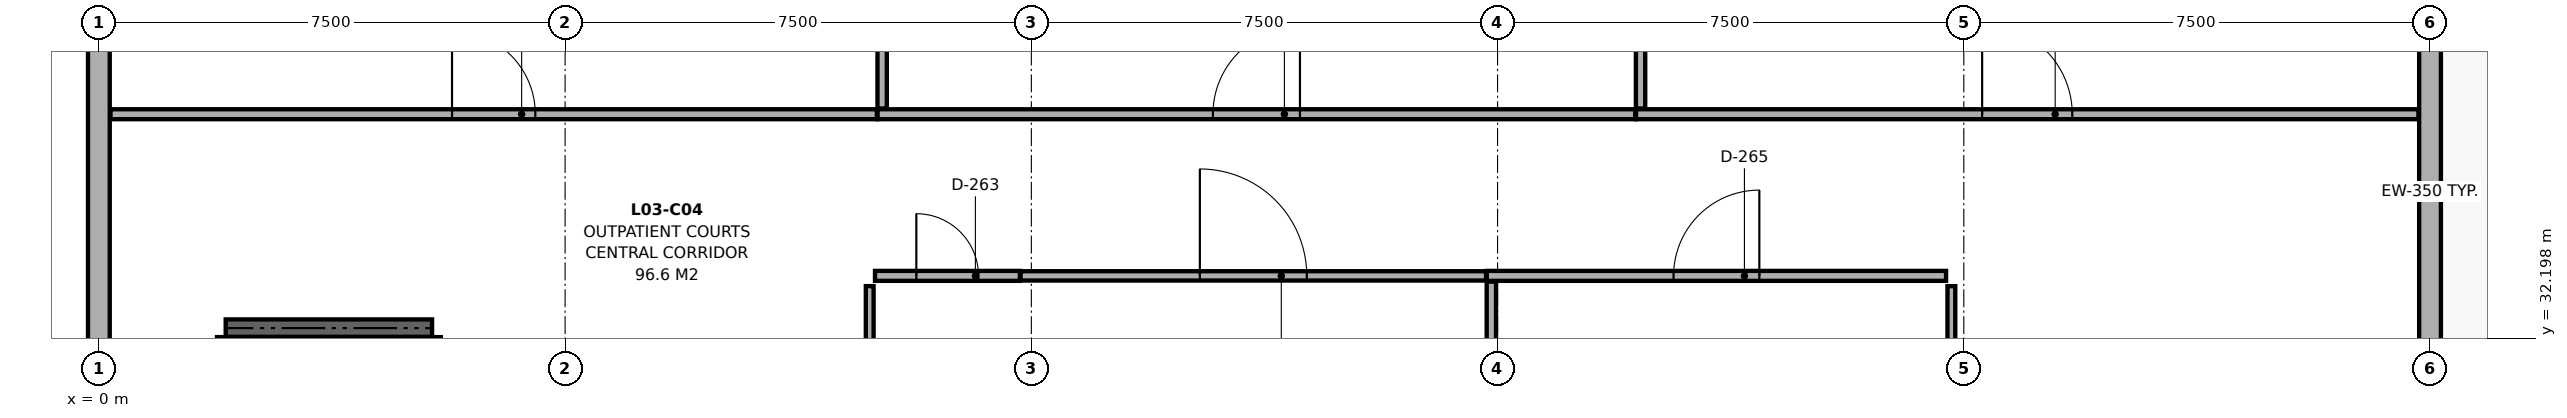
"""IFC4 building model, lengths in metres.
Left out: names, types, materials, properties, quantities, classifications, styles, units other than length and angle.
Written with IfcOpenShell. Run it as: python <this file> out.ifc"""

import sys

from ifc_helpers import new_model, si_unit, direction, frame, frame_2d, origin, place, context, subcontext, project, spatial, rectangle, extrude, element, fill, save


model = new_model("IFC4")
c1 = context("Model", 3, precision=1e-05, world=origin(), true_north=direction((0.0, 1.0)))
c2 = subcontext(c1, "Body", "Model", "MODEL_VIEW")
j1 = project(units=[si_unit("LENGTHUNIT", "METRE"), si_unit("PLANEANGLEUNIT", "RADIAN")], contexts=[c1])
p1 = place(None, origin())
s1 = spatial("IfcSite", under=j1, at=p1, CompositionType="ELEMENT")
p2 = place(p1, origin())
s2 = spatial("IfcBuilding", under=s1, at=p2, CompositionType="ELEMENT")
p3 = place(p2, frame((0.0, 0.0, 13.5)))
s3 = spatial("IfcBuildingStorey", under=s2, at=p3, CompositionType="ELEMENT", Elevation=13.5)
p4 = place(p3, frame((37.5, 38.05, 0.0), z_axis=(0.0, 0.0, 1.0), x_axis=(0.0, -1.0, 0.0)))
e1 = element("IfcWall", 1, at=p4, inside=s3, PredefinedType="SOLIDWALL", context=c2, shape_type="SweptSolid", body=[
    extrude(rectangle(XDim=7.0, YDim=0.35, at=frame_2d((3.5, 0.0))), origin(), (0.0, 0.0, 1.0), 3.7),
])
p5 = place(p3, frame((0.0, 31.1, 0.0), z_axis=(0.0, 0.0, 1.0), x_axis=(0.0, 1.0, 0.0)))
e2 = element("IfcWall", 2, at=p5, inside=s3, PredefinedType="SOLIDWALL", context=c2, shape_type="SweptSolid", body=[
    extrude(rectangle(XDim=6.9, YDim=0.35, at=frame_2d((3.45, 0.0))), origin(), (0.0, 0.0, 1.0), 2.805),
])
p6 = place(p3, frame((5.36, 24.985, 0.0), z_axis=(0.0, 0.0, 1.0), x_axis=(0.0, 1.0, 0.0)))
e3 = element("IfcWall", 3, at=p6, inside=s3, PredefinedType="SHEAR", context=c2, shape_type="SweptSolid", body=[
    extrude(rectangle(XDim=7.23, YDim=0.28, at=frame_2d((3.615, 0.0))), origin(), (0.0, 0.0, 1.0), 3.72),
])
p7 = place(p3, frame((5.36, 32.36, 0.0), z_axis=(0.0, 0.0, 1.0), x_axis=(-1.0, 0.0, 0.0)))
e4 = element("IfcWall", 4, at=p7, inside=s3, PredefinedType="SHEAR", context=c2, shape_type="SweptSolid", body=[
    extrude(rectangle(XDim=3.32, YDim=0.28, at=frame_2d((1.66, 0.0))), origin(), (0.0, 0.0, 1.0), 3.72),
])
p8 = place(p3, frame((2.04, 32.215, 0.0), z_axis=(0.0, 0.0, 1.0), x_axis=(0.0, -1.0, 0.0)))
e5 = element("IfcWall", 5, at=p8, inside=s3, PredefinedType="SHEAR", context=c2, shape_type="SweptSolid", body=[
    extrude(rectangle(XDim=7.23, YDim=0.28, at=frame_2d((3.615, 0.0))), origin(), (0.0, 0.0, 1.0), 3.72),
])
p9 = place(p3, frame((0.187, 35.8, 0.0), z_axis=(0.0, 0.0, 1.0), x_axis=(1.0, 0.0, 0.0)))
e6 = element("IfcWall", 6, at=p9, inside=s3, PredefinedType="PARTITIONING", context=c2, shape_type="SweptSolid", body=[
    extrude(rectangle(XDim=12.328, YDim=0.16, at=frame_2d((6.164, 0.0))), origin(), (0.0, 0.0, 1.0), 2.805),
])
p10 = place(p9, frame((5.494, 0.0, 0.0)))
e7 = element("IfcOpeningElement", 7, at=p10, cuts=e6, PredefinedType="OPENING", context=c2, shape_type="SweptSolid", body=[
    extrude(rectangle(XDim=1.34, YDim=2.24, at=frame_2d((0.67, 1.12))), frame((0.0, 0.092, 0.0), z_axis=(0.0, -1.0, 0.0), x_axis=(1.0, 0.0, 0.0)), (0.0, 0.0, 1.0), 0.184),
])
p11 = place(p3, frame((12.527, 35.8, 0.0), z_axis=(0.0, 0.0, 1.0), x_axis=(1.0, 0.0, 0.0)))
e8 = element("IfcWall", 8, at=p11, inside=s3, PredefinedType="PARTITIONING", context=c2, shape_type="SweptSolid", body=[
    extrude(rectangle(XDim=12.188, YDim=0.16, at=frame_2d((6.094, 0.0))), origin(), (0.0, 0.0, 1.0), 2.805),
])
p12 = place(p11, frame((5.394, 0.0, 0.0)))
e9 = element("IfcOpeningElement", 9, at=p12, cuts=e8, PredefinedType="OPENING", context=c2, shape_type="SweptSolid", body=[
    extrude(rectangle(XDim=1.4, YDim=2.25, at=frame_2d((0.7, 1.125))), frame((0.0, 0.092, 0.0), z_axis=(0.0, -1.0, 0.0), x_axis=(1.0, 0.0, 0.0)), (0.0, 0.0, 1.0), 0.184),
])
p13 = place(p3, frame((24.727, 35.8, 0.0), z_axis=(0.0, 0.0, 1.0), x_axis=(1.0, 0.0, 0.0)))
e10 = element("IfcWall", 10, at=p13, inside=s3, PredefinedType="PARTITIONING", context=c2, shape_type="SweptSolid", body=[
    extrude(rectangle(XDim=12.586, YDim=0.16, at=frame_2d((6.293, 0.0))), origin(), (0.0, 0.0, 1.0), 3.055),
])
p14 = place(p13, frame((5.568, 0.0, 0.0)))
e11 = element("IfcOpeningElement", 11, at=p14, cuts=e10, PredefinedType="OPENING", context=c2, shape_type="SweptSolid", body=[
    extrude(rectangle(XDim=1.45, YDim=2.26, at=frame_2d((0.725, 1.13))), frame((0.0, 0.092, 0.0), z_axis=(0.0, -1.0, 0.0), x_axis=(1.0, 0.0, 0.0)), (0.0, 0.0, 1.0), 0.184),
])
p15 = place(p3, frame((12.485, 33.2, 0.0), z_axis=(0.0, 0.0, 1.0), x_axis=(1.0, 0.0, 0.0)))
e12 = element("IfcWall", 12, at=p15, inside=s3, PredefinedType="PARTITIONING", context=c2, shape_type="SweptSolid", body=[
    extrude(rectangle(XDim=2.33, YDim=0.16, at=frame_2d((1.165, 0.0))), origin(), (0.0, 0.0, 1.0), 2.805),
])
p16 = place(p15, frame((0.665, 0.0, 0.0)))
e13 = element("IfcOpeningElement", 13, at=p16, cuts=e12, PredefinedType="OPENING", context=c2, shape_type="SweptSolid", body=[
    extrude(rectangle(XDim=1.0, YDim=2.15, at=frame_2d((0.5, 1.075))), frame((0.0, 0.092, 0.0), z_axis=(0.0, -1.0, 0.0), x_axis=(1.0, 0.0, 0.0)), (0.0, 0.0, 1.0), 0.184),
])
p17 = place(p3, frame((14.827, 33.2, 0.0), z_axis=(0.0, 0.0, 1.0), x_axis=(1.0, 0.0, 0.0)))
e14 = element("IfcWall", 14, at=p17, inside=s3, PredefinedType="PARTITIONING", context=c2, shape_type="SweptSolid", body=[
    extrude(rectangle(XDim=7.488, YDim=0.15, at=frame_2d((3.744, 0.0))), origin(), (0.0, 0.0, 1.0), 2.805),
])
p18 = place(p17, frame((2.884, 0.0, 0.0)))
e15 = element("IfcOpeningElement", 15, at=p18, cuts=e14, PredefinedType="OPENING", context=c2, shape_type="SweptSolid", body=[
    extrude(rectangle(XDim=1.72, YDim=2.34, at=frame_2d((0.86, 1.17))), frame((0.0, 0.087, 0.0), z_axis=(0.0, -1.0, 0.0), x_axis=(1.0, 0.0, 0.0)), (0.0, 0.0, 1.0), 0.174),
])
p19 = place(p3, frame((22.327, 33.2, 0.0), z_axis=(0.0, 0.0, 1.0), x_axis=(1.0, 0.0, 0.0)))
e16 = element("IfcWall", 16, at=p19, inside=s3, PredefinedType="PARTITIONING", context=c2, shape_type="SweptSolid", body=[
    extrude(rectangle(XDim=7.388, YDim=0.16, at=frame_2d((3.694, 0.0))), origin(), (0.0, 0.0, 1.0), 2.805),
])
p20 = place(p19, frame((3.004, 0.0, 0.0)))
e17 = element("IfcOpeningElement", 17, at=p20, cuts=e16, PredefinedType="OPENING", context=c2, shape_type="SweptSolid", body=[
    extrude(rectangle(XDim=1.38, YDim=2.3, at=frame_2d((0.69, 1.15))), frame((0.0, 0.092, 0.0), z_axis=(0.0, -1.0, 0.0), x_axis=(1.0, 0.0, 0.0)), (0.0, 0.0, 1.0), 0.184),
])
p21 = place(p3, frame((12.6, 35.892, 0.0), z_axis=(0.0, 0.0, 1.0), x_axis=(0.0, 1.0, 0.0)))
e18 = element("IfcWall", 18, at=p21, inside=s3, PredefinedType="PARTITIONING", context=c2, shape_type="SweptSolid", body=[
    extrude(rectangle(XDim=9.663, YDim=0.15, at=frame_2d((4.832, 0.0))), origin(), (0.0, 0.0, 1.0), 2.805),
])
p22 = place(p3, frame((24.8, 35.892, 0.0), z_axis=(0.0, 0.0, 1.0), x_axis=(0.0, 1.0, 0.0)))
e19 = element("IfcWall", 19, at=p22, inside=s3, PredefinedType="PARTITIONING", context=c2, shape_type="SweptSolid", body=[
    extrude(rectangle(XDim=9.721, YDim=0.15, at=frame_2d((4.86, 0.0))), origin(), (0.0, 0.0, 1.0), 2.805),
])
p23 = place(p3, frame((12.4, 15.965, 0.0), z_axis=(0.0, 0.0, 1.0), x_axis=(0.0, 1.0, 0.0)))
e20 = element("IfcWall", 20, at=p23, inside=s3, PredefinedType="PARTITIONING", context=c2, shape_type="SweptSolid", body=[
    extrude(rectangle(XDim=17.07, YDim=0.125, at=frame_2d((8.535, 0.0))), origin(), (0.0, 0.0, 1.0), 2.805),
])
p24 = place(p3, frame((22.4, 31.112, 0.0), z_axis=(0.0, 0.0, 1.0), x_axis=(0.0, 1.0, 0.0)))
e21 = element("IfcWall", 21, at=p24, inside=s3, PredefinedType="PARTITIONING", context=c2, shape_type="SweptSolid", body=[
    extrude(rectangle(XDim=1.996, YDim=0.15, at=frame_2d((0.998, 0.0))), origin(), (0.0, 0.0, 1.0), 2.805),
])
p25 = place(p3, frame((29.8, 31.112, 0.0), z_axis=(0.0, 0.0, 1.0), x_axis=(0.0, 1.0, 0.0)))
e22 = element("IfcWall", 22, at=p25, inside=s3, PredefinedType="PARTITIONING", context=c2, shape_type="SweptSolid", body=[
    extrude(rectangle(XDim=1.923, YDim=0.125, at=frame_2d((0.961, 0.0))), origin(), (0.0, 0.0, 1.0), 3.055),
])
p26 = place(p10, origin())
e23 = element("IfcDoor", 23, at=p26, inside=s3, OperationType="SINGLE_SWING_LEFT", PredefinedType="DOOR", context=c2, shape_type="SweptSolid", body=[
    extrude(rectangle(XDim=1.34, YDim=2.24, at=frame_2d((0.67, 1.12))), frame((0.0, 0.025, 0.0), z_axis=(0.0, -1.0, 0.0), x_axis=(1.0, 0.0, 0.0)), (0.0, 0.0, 1.0), 0.05),
])
fill(e7, e23)
p27 = place(p12, origin())
e24 = element("IfcDoor", 24, at=p27, inside=s3, OperationType="SINGLE_SWING_RIGHT", PredefinedType="DOOR", context=c2, shape_type="SweptSolid", body=[
    extrude(rectangle(XDim=1.4, YDim=2.25, at=frame_2d((0.7, 1.125))), frame((0.0, 0.025, 0.0), z_axis=(0.0, -1.0, 0.0), x_axis=(1.0, 0.0, 0.0)), (0.0, 0.0, 1.0), 0.05),
])
fill(e9, e24)
p28 = place(p14, origin())
e25 = element("IfcDoor", 25, at=p28, inside=s3, OperationType="SINGLE_SWING_LEFT", PredefinedType="DOOR", context=c2, shape_type="SweptSolid", body=[
    extrude(rectangle(XDim=1.45, YDim=2.26, at=frame_2d((0.725, 1.13))), frame((0.0, 0.025, 0.0), z_axis=(0.0, -1.0, 0.0), x_axis=(1.0, 0.0, 0.0)), (0.0, 0.0, 1.0), 0.05),
])
fill(e11, e25)
p29 = place(p16, origin())
e26 = element("IfcDoor", 26, at=p29, inside=s3, OperationType="SINGLE_SWING_LEFT", PredefinedType="DOOR", context=c2, shape_type="SweptSolid", body=[
    extrude(rectangle(XDim=1.0, YDim=2.15, at=frame_2d((0.5, 1.075))), frame((0.0, 0.025, 0.0), z_axis=(0.0, -1.0, 0.0), x_axis=(1.0, 0.0, 0.0)), (0.0, 0.0, 1.0), 0.05),
])
fill(e13, e26)
p30 = place(p18, origin())
e27 = element("IfcDoor", 27, at=p30, inside=s3, OperationType="SINGLE_SWING_LEFT", PredefinedType="DOOR", context=c2, shape_type="SweptSolid", body=[
    extrude(rectangle(XDim=1.72, YDim=2.34, at=frame_2d((0.86, 1.17))), frame((0.0, 0.025, 0.0), z_axis=(0.0, -1.0, 0.0), x_axis=(1.0, 0.0, 0.0)), (0.0, 0.0, 1.0), 0.05),
])
fill(e15, e27)
p31 = place(p20, origin())
e28 = element("IfcDoor", 28, at=p31, inside=s3, OperationType="SINGLE_SWING_RIGHT", PredefinedType="DOOR", context=c2, shape_type="SweptSolid", body=[
    extrude(rectangle(XDim=1.38, YDim=2.3, at=frame_2d((0.69, 1.15))), frame((0.0, 0.025, 0.0), z_axis=(0.0, -1.0, 0.0), x_axis=(1.0, 0.0, 0.0)), (0.0, 0.0, 1.0), 0.05),
])
fill(e17, e28)
save(model, sys.argv[1])
